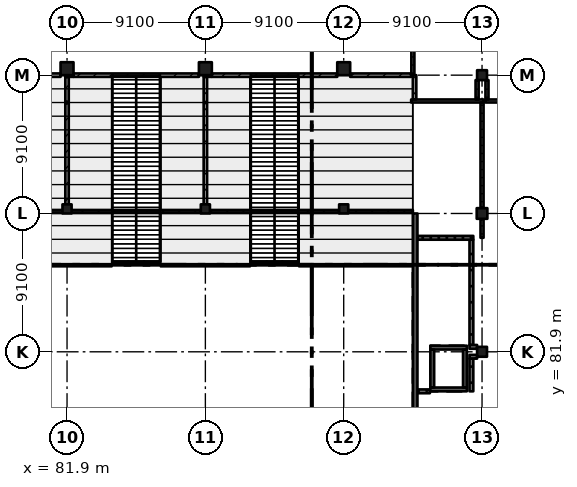
"""IFC4 building model, lengths in metres.
Left out: names, types, materials, properties, quantities, classifications, styles, units other than length and angle.
Written with IfcOpenShell. Run it as: python <this file> out.ifc"""

import sys

from ifc_helpers import new_model, si_unit, direction, frame, frame_2d, origin, origin_2d, place, context, subcontext, project, spatial, rectangle, extrude, element, fill, save


model = new_model("IFC4")
c1 = context("Model", 3, precision=1e-05, world=origin(), true_north=direction((0.0, 1.0)))
c2 = subcontext(c1, "Body", "Model", "MODEL_VIEW")
j1 = project(units=[si_unit("LENGTHUNIT", "METRE"), si_unit("PLANEANGLEUNIT", "RADIAN")], contexts=[c1])
p1 = place(None, origin())
s1 = spatial("IfcSite", under=j1, at=p1, CompositionType="ELEMENT")
p2 = place(p1, origin())
s2 = spatial("IfcBuilding", under=s1, at=p2, CompositionType="ELEMENT")
p3 = place(p2, frame((0.0, 0.0, 15.47)))
s3 = spatial("IfcBuildingStorey", under=s2, at=p3, CompositionType="ELEMENT", Elevation=15.47)
p4 = place(p3, frame((81.9, 91.3, 0.0), z_axis=(0.0, 0.0, 1.0), x_axis=(1.0, 0.0, 0.0)))
e1 = element("IfcColumn", 1, at=p4, inside=s3, PredefinedType="COLUMN", context=c2, shape_type="SweptSolid", body=[
    extrude(rectangle(XDim=0.6, YDim=0.6, at=origin_2d()), origin(), (0.0, 0.0, 1.0), 2.71),
])
p5 = place(p3, frame((81.9, 100.525, 0.0), z_axis=(0.0, 0.0, 1.0), x_axis=(1.0, 0.0, 0.0)))
e2 = element("IfcColumn", 2, at=p5, inside=s3, PredefinedType="COLUMN", context=c2, shape_type="SweptSolid", body=[
    extrude(rectangle(XDim=0.85, YDim=0.85, at=origin_2d()), origin(), (0.0, 0.0, 1.0), 4.55),
])
p6 = place(p3, frame((91.0, 91.3, 0.0), z_axis=(0.0, 0.0, 1.0), x_axis=(1.0, 0.0, 0.0)))
e3 = element("IfcColumn", 3, at=p6, inside=s3, PredefinedType="COLUMN", context=c2, shape_type="SweptSolid", body=[
    extrude(rectangle(XDim=0.6, YDim=0.6, at=origin_2d()), origin(), (0.0, 0.0, 1.0), 2.71),
])
p7 = place(p3, frame((91.0, 100.525, 0.0), z_axis=(0.0, 0.0, 1.0), x_axis=(1.0, 0.0, 0.0)))
e4 = element("IfcColumn", 4, at=p7, inside=s3, PredefinedType="COLUMN", context=c2, shape_type="SweptSolid", body=[
    extrude(rectangle(XDim=0.85, YDim=0.85, at=origin_2d()), origin(), (0.0, 0.0, 1.0), 4.55),
])
p8 = place(p3, frame((100.1, 91.3, 0.0), z_axis=(0.0, 0.0, 1.0), x_axis=(1.0, 0.0, 0.0)))
e5 = element("IfcColumn", 5, at=p8, inside=s3, PredefinedType="COLUMN", context=c2, shape_type="SweptSolid", body=[
    extrude(rectangle(XDim=0.6, YDim=0.6, at=origin_2d()), origin(), (0.0, 0.0, 1.0), 2.71),
])
p9 = place(p3, frame((100.1, 100.525, 0.0), z_axis=(0.0, 0.0, 1.0), x_axis=(1.0, 0.0, 0.0)))
e6 = element("IfcColumn", 6, at=p9, inside=s3, PredefinedType="COLUMN", context=c2, shape_type="SweptSolid", body=[
    extrude(rectangle(XDim=0.85, YDim=0.85, at=origin_2d()), origin(), (0.0, 0.0, 1.0), 4.55),
])
p10 = place(p3, frame((109.2, 81.9, 0.0), z_axis=(0.0, 0.0, 1.0), x_axis=(1.0, 0.0, 0.0)))
e7 = element("IfcColumn", 7, at=p10, inside=s3, PredefinedType="COLUMN", context=c2, shape_type="SweptSolid", body=[
    extrude(rectangle(XDim=0.65, YDim=0.65, at=origin_2d()), origin(), (0.0, 0.0, 1.0), 4.55),
])
p11 = place(p3, frame((109.2, 91.0, 0.0), z_axis=(0.0, 0.0, 1.0), x_axis=(1.0, 0.0, 0.0)))
e8 = element("IfcColumn", 8, at=p11, inside=s3, PredefinedType="COLUMN", context=c2, shape_type="SweptSolid", body=[
    extrude(rectangle(XDim=0.7, YDim=0.7, at=origin_2d()), origin(), (0.0, 0.0, 1.0), 4.55),
])
p12 = place(p3, frame((109.2, 100.1, 0.0), z_axis=(0.0, 0.0, 1.0), x_axis=(1.0, 0.0, 0.0)))
e9 = element("IfcColumn", 9, at=p12, inside=s3, PredefinedType="COLUMN", context=c2, shape_type="SweptSolid", body=[
    extrude(rectangle(XDim=0.65, YDim=0.65, at=origin_2d()), origin(), (0.0, 0.0, 1.0), 4.55),
])
p13 = place(p3, frame((104.8, 68.25, 0.0), z_axis=(0.0, 0.0, 1.0), x_axis=(0.0, 1.0, 0.0)))
e10 = element("IfcWall", 10, at=p13, inside=s3, PredefinedType="SHEAR", context=c2, shape_type="SweptSolid", body=[
    extrude(rectangle(XDim=22.75, YDim=0.3, at=frame_2d((11.375, 0.0))), origin(), (0.0, 0.0, 1.0), 4.55),
])
p14 = place(p3, frame((108.2, 79.425, 0.0), z_axis=(0.0, 0.0, 1.0), x_axis=(-1.0, 0.0, 0.0)))
e11 = element("IfcWall", 11, at=p14, inside=s3, PredefinedType="SHEAR", context=c2, shape_type="SweptSolid", body=[
    extrude(rectangle(XDim=2.4, YDim=0.25, at=frame_2d((1.2, 0.0))), origin(), (0.0, 0.0, 1.0), 4.55),
])
p15 = place(p14, frame((0.75, 0.0, 0.0)))
e12 = element("IfcOpeningElement", 12, at=p15, cuts=e11, PredefinedType="OPENING", context=c2, shape_type="SweptSolid", body=[
    extrude(rectangle(XDim=0.9, YDim=2.1, at=frame_2d((0.45, 1.05))), frame((0.0, 0.135, 0.0), z_axis=(0.0, -1.0, 0.0), x_axis=(1.0, 0.0, 0.0)), (0.0, 0.0, 1.0), 0.27),
])
p16 = place(p3, frame((108.2, 82.175, 0.0), z_axis=(0.0, 0.0, 1.0), x_axis=(-1.0, 0.0, 0.0)))
e13 = element("IfcWall", 13, at=p16, inside=s3, PredefinedType="SHEAR", context=c2, shape_type="SweptSolid", body=[
    extrude(rectangle(XDim=2.4, YDim=0.25, at=frame_2d((1.2, 0.0))), origin(), (0.0, 0.0, 1.0), 4.55),
])
for number, where, z_axis, x_axis in (
    (14, (105.925, 82.05, 0.0), (0.0, 0.0, 1.0), (0.0, -1.0, 0.0)),
    (15, (108.075, 82.05, 0.0), (0.0, 0.0, 1.0), (0.0, -1.0, 0.0)),
):
    element("IfcWall", number, at=place(p3, frame(where, z_axis=z_axis, x_axis=x_axis)), inside=s3, PredefinedType="SHEAR", context=c2, shape_type="SweptSolid", body=[
        extrude(rectangle(XDim=2.5, YDim=0.25, at=frame_2d((1.25, 0.0))), origin(), (0.0, 0.0, 1.0), 4.55),
    ])
p17 = place(p3, frame((81.475, 100.1, 0.0), z_axis=(0.0, 0.0, 1.0), x_axis=(-1.0, 0.0, 0.0)))
e16 = element("IfcWall", 16, at=p17, inside=s3, PredefinedType="PARTITIONING", context=c2, shape_type="SweptSolid", body=[
    extrude(rectangle(XDim=8.25, YDim=0.225, at=frame_2d((4.125, 0.0))), origin(), (0.0, 0.0, 1.0), 3.6),
])
p18 = place(p17, frame((3.65, 0.0, 0.0)))
e17 = element("IfcOpeningElement", 17, at=p18, cuts=e16, PredefinedType="OPENING", context=c2, shape_type="SweptSolid", body=[
    extrude(rectangle(XDim=1.0, YDim=2.4, at=frame_2d((0.5, 1.2))), frame((0.0, 0.123, 0.0), z_axis=(0.0, -1.0, 0.0), x_axis=(1.0, 0.0, 0.0)), (0.0, 0.0, 1.0), 0.245),
])
p19 = place(p3, frame((81.9, 98.27, 0.0), z_axis=(0.0, 0.0, 1.0), x_axis=(0.0, -1.0, 0.0)))
e18 = element("IfcWall", 18, at=p19, inside=s3, PredefinedType="PARTITIONING", context=c2, shape_type="SweptSolid", body=[
    extrude(rectangle(XDim=6.67, YDim=0.225, at=frame_2d((3.335, 0.0))), origin(), (0.0, 0.0, 1.0), 3.22),
])
p20 = place(p3, frame((81.9, 99.988, 0.0), z_axis=(0.0, 0.0, 1.0), x_axis=(0.0, -1.0, 0.0)))
e19 = element("IfcWall", 19, at=p20, inside=s3, PredefinedType="PARTITIONING", context=c2, shape_type="SweptSolid", body=[
    extrude(rectangle(XDim=1.657, YDim=0.225, at=frame_2d((0.829, 0.0))), origin(), (0.0, 0.0, 1.0), 3.22),
])
p21 = place(p3, frame((82.325, 100.1, 0.0), z_axis=(0.0, 0.0, 1.0), x_axis=(-1.0, 0.0, 0.0)))
e20 = element("IfcWall", 20, at=p21, inside=s3, PredefinedType="PARTITIONING", context=c2, shape_type="SweptSolid", body=[
    extrude(rectangle(XDim=0.537, YDim=0.225, at=frame_2d((0.269, 0.0))), origin(), (0.0, 0.0, 1.0), 3.22),
])
p22 = place(p3, frame((90.575, 100.1, 0.0), z_axis=(0.0, 0.0, 1.0), x_axis=(-1.0, 0.0, 0.0)))
e21 = element("IfcWall", 21, at=p22, inside=s3, PredefinedType="PARTITIONING", context=c2, shape_type="SweptSolid", body=[
    extrude(rectangle(XDim=8.25, YDim=0.225, at=frame_2d((4.125, 0.0))), origin(), (0.0, 0.0, 1.0), 3.6),
])
p23 = place(p22, frame((3.65, 0.0, 0.0)))
e22 = element("IfcOpeningElement", 22, at=p23, cuts=e21, PredefinedType="OPENING", context=c2, shape_type="SweptSolid", body=[
    extrude(rectangle(XDim=1.0, YDim=2.4, at=frame_2d((0.5, 1.2))), frame((0.0, 0.123, 0.0), z_axis=(0.0, -1.0, 0.0), x_axis=(1.0, 0.0, 0.0)), (0.0, 0.0, 1.0), 0.245),
])
p24 = place(p3, frame((91.0, 98.27, 0.0), z_axis=(0.0, 0.0, 1.0), x_axis=(0.0, -1.0, 0.0)))
e23 = element("IfcWall", 23, at=p24, inside=s3, PredefinedType="PARTITIONING", context=c2, shape_type="SweptSolid", body=[
    extrude(rectangle(XDim=6.67, YDim=0.225, at=frame_2d((3.335, 0.0))), origin(), (0.0, 0.0, 1.0), 3.22),
])
p25 = place(p3, frame((91.0, 99.988, 0.0), z_axis=(0.0, 0.0, 1.0), x_axis=(0.0, -1.0, 0.0)))
e24 = element("IfcWall", 24, at=p25, inside=s3, PredefinedType="PARTITIONING", context=c2, shape_type="SweptSolid", body=[
    extrude(rectangle(XDim=1.657, YDim=0.225, at=frame_2d((0.829, 0.0))), origin(), (0.0, 0.0, 1.0), 3.22),
])
p26 = place(p3, frame((91.425, 100.1, 0.0), z_axis=(0.0, 0.0, 1.0), x_axis=(-1.0, 0.0, 0.0)))
e25 = element("IfcWall", 25, at=p26, inside=s3, PredefinedType="PARTITIONING", context=c2, shape_type="SweptSolid", body=[
    extrude(rectangle(XDim=0.538, YDim=0.225, at=frame_2d((0.269, 0.0))), origin(), (0.0, 0.0, 1.0), 3.22),
])
p27 = place(p3, frame((99.675, 100.1, 0.0), z_axis=(0.0, 0.0, 1.0), x_axis=(-1.0, 0.0, 0.0)))
e26 = element("IfcWall", 26, at=p27, inside=s3, PredefinedType="PARTITIONING", context=c2, shape_type="SweptSolid", body=[
    extrude(rectangle(XDim=8.25, YDim=0.225, at=frame_2d((4.125, 0.0))), origin(), (0.0, 0.0, 1.0), 3.6),
])
p28 = place(p27, frame((3.65, 0.0, 0.0)))
e27 = element("IfcOpeningElement", 27, at=p28, cuts=e26, PredefinedType="OPENING", context=c2, shape_type="SweptSolid", body=[
    extrude(rectangle(XDim=1.0, YDim=2.4, at=frame_2d((0.5, 1.2))), frame((0.0, 0.123, 0.0), z_axis=(0.0, -1.0, 0.0), x_axis=(1.0, 0.0, 0.0)), (0.0, 0.0, 1.0), 0.245),
])
p29 = place(p3, frame((104.538, 98.4, 0.0), z_axis=(0.0, 0.0, 1.0), x_axis=(1.0, 0.0, 0.0)))
e28 = element("IfcWall", 28, at=p29, inside=s3, PredefinedType="PARTITIONING", context=c2, shape_type="SweptSolid", body=[
    extrude(rectangle(XDim=4.762, YDim=0.2, at=frame_2d((2.381, 0.0))), origin(), (0.0, 0.0, 1.0), 4.3),
])
p30 = place(p29, frame((1.25, 0.0, 0.0)))
e29 = element("IfcOpeningElement", 29, at=p30, cuts=e28, PredefinedType="OPENING", context=c2, shape_type="SweptSolid", body=[
    extrude(rectangle(XDim=1.8, YDim=2.4, at=frame_2d((0.9, 1.2))), frame((0.0, 0.11, 0.0), z_axis=(0.0, -1.0, 0.0), x_axis=(1.0, 0.0, 0.0)), (0.0, 0.0, 1.0), 0.22),
])
p31 = place(p3, frame((104.538, 100.1, 0.0), z_axis=(0.0, 0.0, 1.0), x_axis=(-1.0, 0.0, 0.0)))
e30 = element("IfcWall", 30, at=p31, inside=s3, PredefinedType="PARTITIONING", context=c2, shape_type="SweptSolid", body=[
    extrude(rectangle(XDim=4.013, YDim=0.225, at=frame_2d((2.006, 0.0))), origin(), (0.0, 0.0, 1.0), 3.6),
])
p32 = place(p3, frame((104.763, 98.5, 0.0), z_axis=(0.0, 0.0, 1.0), x_axis=(0.0, 1.0, 0.0)))
e31 = element("IfcWall", 31, at=p32, inside=s3, PredefinedType="PARTITIONING", context=c2, shape_type="SweptSolid", body=[
    extrude(rectangle(XDim=1.6, YDim=0.225, at=frame_2d((0.8, 0.0))), origin(), (0.0, 0.0, 1.0), 4.3),
])
p33 = place(p3, frame((104.65, 100.1, 0.0), z_axis=(0.0, 0.0, 1.0), x_axis=(0.0, 1.0, 0.0)))
e32 = element("IfcWall", 32, at=p33, inside=s3, PredefinedType="PARTITIONING", context=c2, shape_type="SweptSolid", body=[
    extrude(rectangle(XDim=3.6, YDim=0.2, at=frame_2d((1.8, 0.0))), origin(), (0.0, 0.0, 1.0), 3.7),
])
p34 = place(p33, frame((0.65, 0.0, 0.0)))
e33 = element("IfcOpeningElement", 33, at=p34, cuts=e32, PredefinedType="OPENING", context=c2, shape_type="SweptSolid", body=[
    extrude(rectangle(XDim=2.4, YDim=2.4, at=frame_2d((1.2, 1.2))), frame((0.0, 0.11, 0.0), z_axis=(0.0, -1.0, 0.0), x_axis=(1.0, 0.0, 0.0)), (0.0, 0.0, 1.0), 0.22),
])
p35 = place(p3, frame((105.77, 79.3, 0.0), z_axis=(0.0, 0.0, 1.0), x_axis=(-1.0, 0.0, 0.0)))
e34 = element("IfcWall", 34, at=p35, inside=s3, PredefinedType="SOLIDWALL", context=c2, shape_type="SweptSolid", body=[
    extrude(rectangle(XDim=0.82, YDim=0.25, at=frame_2d((0.41, 0.0))), origin(), (0.0, 0.0, 1.0), 4.3),
])
p36 = place(p3, frame((108.375, 81.575, 0.0), z_axis=(0.0, 0.0, 1.0), x_axis=(1.0, 0.0, 0.0)))
e35 = element("IfcWall", 35, at=p36, inside=s3, PredefinedType="SOLIDWALL", context=c2, shape_type="SweptSolid", body=[
    extrude(rectangle(XDim=0.5, YDim=0.25, at=frame_2d((0.25, 0.0))), origin(), (0.0, 0.0, 1.0), 4.3),
])
p37 = place(p3, frame((108.5, 79.3, 0.0), z_axis=(0.0, 0.0, 1.0), x_axis=(0.0, 1.0, 0.0)))
e36 = element("IfcWall", 36, at=p37, inside=s3, PredefinedType="SOLIDWALL", context=c2, shape_type="SweptSolid", body=[
    extrude(rectangle(XDim=2.15, YDim=0.25, at=frame_2d((1.075, 0.0))), origin(), (0.0, 0.0, 1.0), 4.3),
])
p38 = place(p3, frame((108.5, 82.35, 0.0), z_axis=(0.0, 0.0, 1.0), x_axis=(0.0, 1.0, 0.0)))
e37 = element("IfcWall", 37, at=p38, inside=s3, PredefinedType="SOLIDWALL", context=c2, shape_type="SweptSolid", body=[
    extrude(rectangle(XDim=6.925, YDim=0.25, at=frame_2d((3.462, 0.0))), origin(), (0.0, 0.0, 1.0), 4.3),
])
p39 = place(p3, frame((108.625, 89.4, 0.0), z_axis=(0.0, 0.0, 1.0), x_axis=(-1.0, 0.0, 0.0)))
e38 = element("IfcWall", 38, at=p39, inside=s3, PredefinedType="SOLIDWALL", context=c2, shape_type="SweptSolid", body=[
    extrude(rectangle(XDim=3.675, YDim=0.25, at=frame_2d((1.837, 0.0))), origin(), (0.0, 0.0, 1.0), 4.3),
])
p40 = place(p39, frame((1.45, 0.0, 0.0)))
e39 = element("IfcOpeningElement", 39, at=p40, cuts=e38, PredefinedType="OPENING", context=c2, shape_type="SweptSolid", body=[
    extrude(rectangle(XDim=0.8, YDim=2.1, at=frame_2d((0.4, 1.05))), frame((0.0, 0.135, 0.0), z_axis=(0.0, -1.0, 0.0), x_axis=(1.0, 0.0, 0.0)), (0.0, 0.0, 1.0), 0.27),
])
p41 = place(p3, frame((108.875, 82.225, 0.0), z_axis=(0.0, 0.0, 1.0), x_axis=(-1.0, 0.0, 0.0)))
e40 = element("IfcWall", 40, at=p41, inside=s3, PredefinedType="SOLIDWALL", context=c2, shape_type="SweptSolid", body=[
    extrude(rectangle(XDim=0.5, YDim=0.25, at=frame_2d((0.25, 0.0))), origin(), (0.0, 0.0, 1.0), 4.3),
])
p42 = place(p3, frame((108.875, 98.5, 0.0), z_axis=(0.0, 0.0, 1.0), x_axis=(0.0, 1.0, 0.0)))
e41 = element("IfcWall", 41, at=p42, inside=s3, PredefinedType="PARTITIONING", context=c2, shape_type="SweptSolid", body=[
    extrude(rectangle(XDim=1.275, YDim=0.2, at=frame_2d((0.637, 0.0))), origin(), (0.0, 0.0, 1.0), 4.3),
])
p43 = place(p3, frame((109.2, 89.4, 0.0), z_axis=(0.0, 0.0, 1.0), x_axis=(0.0, 1.0, 0.0)))
e42 = element("IfcWall", 42, at=p43, inside=s3, PredefinedType="PARTITIONING", context=c2, shape_type="SweptSolid", body=[
    extrude(rectangle(XDim=1.25, YDim=0.2, at=frame_2d((0.625, 0.0))), origin(), (0.0, 0.0, 1.0), 3.55),
])
p44 = place(p3, frame((109.2, 91.35, 0.0), z_axis=(0.0, 0.0, 1.0), x_axis=(0.0, 1.0, 0.0)))
e43 = element("IfcWall", 43, at=p44, inside=s3, PredefinedType="PARTITIONING", context=c2, shape_type="SweptSolid", body=[
    extrude(rectangle(XDim=6.95, YDim=0.2, at=frame_2d((3.475, 0.0))), origin(), (0.0, 0.0, 1.0), 3.55),
])
p45 = place(p44, frame((0.85, 0.0, 0.0)))
e44 = element("IfcOpeningElement", 44, at=p45, cuts=e43, PredefinedType="OPENING", context=c2, shape_type="SweptSolid", body=[
    extrude(rectangle(XDim=1.8, YDim=2.4, at=frame_2d((0.9, 1.2))), frame((0.0, 0.11, 0.0), z_axis=(0.0, -1.0, 0.0), x_axis=(1.0, 0.0, 0.0)), (0.0, 0.0, 1.0), 0.22),
])
p46 = place(p44, frame((4.35, 0.0, 0.0)))
e45 = element("IfcOpeningElement", 45, at=p46, cuts=e43, PredefinedType="OPENING", context=c2, shape_type="SweptSolid", body=[
    extrude(rectangle(XDim=1.8, YDim=2.4, at=frame_2d((0.9, 1.2))), frame((0.0, 0.11, 0.0), z_axis=(0.0, -1.0, 0.0), x_axis=(1.0, 0.0, 0.0)), (0.0, 0.0, 1.0), 0.22),
])
p47 = place(p3, frame((109.425, 98.4, 0.0), z_axis=(0.0, 0.0, 1.0), x_axis=(1.0, 0.0, 0.0)))
e46 = element("IfcWall", 46, at=p47, inside=s3, PredefinedType="PARTITIONING", context=c2, shape_type="SweptSolid", body=[
    extrude(rectangle(XDim=2.745, YDim=0.2, at=frame_2d((1.373, 0.0))), origin(), (0.0, 0.0, 1.0), 4.3),
])
p48 = place(p47, frame((0.45, 0.0, 0.0)))
e47 = element("IfcOpeningElement", 47, at=p48, cuts=e46, PredefinedType="OPENING", context=c2, shape_type="SweptSolid", body=[
    extrude(rectangle(XDim=1.8, YDim=2.4, at=frame_2d((0.9, 1.2))), frame((0.0, 0.11, 0.0), z_axis=(0.0, -1.0, 0.0), x_axis=(1.0, 0.0, 0.0)), (0.0, 0.0, 1.0), 0.22),
])
p49 = place(p3, frame((109.525, 99.775, 0.0), z_axis=(0.0, 0.0, 1.0), x_axis=(0.0, -1.0, 0.0)))
e48 = element("IfcWall", 48, at=p49, inside=s3, PredefinedType="PARTITIONING", context=c2, shape_type="SweptSolid", body=[
    extrude(rectangle(XDim=1.275, YDim=0.2, at=frame_2d((0.637, 0.0))), origin(), (0.0, 0.0, 1.0), 4.3),
])
p50 = place(p3, frame((81.6, 91.13, 0.0), z_axis=(0.0, 0.0, 1.0), x_axis=(-1.0, 0.0, 0.0)))
e49 = element("IfcWall", 49, at=p50, inside=s3, PredefinedType="PARTITIONING", context=c2, shape_type="SweptSolid", body=[
    extrude(rectangle(XDim=8.5, YDim=0.2, at=frame_2d((4.25, 0.0))), origin(), (0.0, 0.0, 1.0), 2.71),
])
p51 = place(p50, frame((1.25, 0.0, 1.1)))
e50 = element("IfcOpeningElement", 50, at=p51, cuts=e49, PredefinedType="OPENING", context=c2, shape_type="SweptSolid", body=[
    extrude(rectangle(XDim=6.0, YDim=1.3, at=frame_2d((3.0, 0.65))), frame((0.0, 0.11, 0.0), z_axis=(0.0, -1.0, 0.0), x_axis=(1.0, 0.0, 0.0)), (0.0, 0.0, 1.0), 0.22),
])
p52 = place(p3, frame((90.7, 91.13, 0.0), z_axis=(0.0, 0.0, 1.0), x_axis=(-1.0, 0.0, 0.0)))
e51 = element("IfcWall", 51, at=p52, inside=s3, PredefinedType="PARTITIONING", context=c2, shape_type="SweptSolid", body=[
    extrude(rectangle(XDim=8.5, YDim=0.2, at=frame_2d((4.25, 0.0))), origin(), (0.0, 0.0, 1.0), 2.71),
])
p53 = place(p52, frame((1.25, 0.0, 1.1)))
e52 = element("IfcOpeningElement", 52, at=p53, cuts=e51, PredefinedType="OPENING", context=c2, shape_type="SweptSolid", body=[
    extrude(rectangle(XDim=6.0, YDim=1.3, at=frame_2d((3.0, 0.65))), frame((0.0, 0.11, 0.0), z_axis=(0.0, -1.0, 0.0), x_axis=(1.0, 0.0, 0.0)), (0.0, 0.0, 1.0), 0.22),
])
p54 = place(p3, frame((104.65, 91.13, 0.0), z_axis=(0.0, 0.0, 1.0), x_axis=(-1.0, 0.0, 0.0)))
e53 = element("IfcWall", 53, at=p54, inside=s3, PredefinedType="PARTITIONING", context=c2, shape_type="SweptSolid", body=[
    extrude(rectangle(XDim=4.25, YDim=0.2, at=frame_2d((2.125, 0.0))), origin(), (0.0, 0.0, 1.0), 2.91),
])
p55 = place(p54, frame((1.125, 0.0, 1.1)))
e54 = element("IfcOpeningElement", 54, at=p55, cuts=e53, PredefinedType="OPENING", context=c2, shape_type="SweptSolid", body=[
    extrude(rectangle(XDim=2.0, YDim=1.3, at=frame_2d((1.0, 0.65))), frame((0.0, 0.11, 0.0), z_axis=(0.0, -1.0, 0.0), x_axis=(1.0, 0.0, 0.0)), (0.0, 0.0, 1.0), 0.22),
])
p56 = place(p3, frame((99.8, 91.13, 0.0), z_axis=(0.0, 0.0, 1.0), x_axis=(-1.0, 0.0, 0.0)))
e55 = element("IfcWall", 55, at=p56, inside=s3, PredefinedType="PARTITIONING", context=c2, shape_type="SweptSolid", body=[
    extrude(rectangle(XDim=8.5, YDim=0.2, at=frame_2d((4.25, 0.0))), origin(), (0.0, 0.0, 1.0), 2.71),
])
p57 = place(p56, frame((1.25, 0.0, 1.1)))
e56 = element("IfcOpeningElement", 56, at=p57, cuts=e55, PredefinedType="OPENING", context=c2, shape_type="SweptSolid", body=[
    extrude(rectangle(XDim=6.0, YDim=1.3, at=frame_2d((3.0, 0.65))), frame((0.0, 0.11, 0.0), z_axis=(0.0, -1.0, 0.0), x_axis=(1.0, 0.0, 0.0)), (0.0, 0.0, 1.0), 0.22),
])
p58 = place(p53, origin())
e57 = element("IfcWindow", 57, at=p58, inside=s3, PartitioningType="SINGLE_PANEL", PredefinedType="WINDOW", context=c2, shape_type="SweptSolid", body=[
    extrude(rectangle(XDim=6.0, YDim=1.3, at=frame_2d((3.0, 0.65))), frame((0.0, 0.03, 0.0), z_axis=(0.0, -1.0, 0.0), x_axis=(1.0, 0.0, 0.0)), (0.0, 0.0, 1.0), 0.06),
])
fill(e52, e57)
p59 = place(p55, origin())
e58 = element("IfcWindow", 58, at=p59, inside=s3, PartitioningType="SINGLE_PANEL", PredefinedType="WINDOW", context=c2, shape_type="SweptSolid", body=[
    extrude(rectangle(XDim=2.0, YDim=1.3, at=frame_2d((1.0, 0.65))), frame((0.0, 0.03, 0.0), z_axis=(0.0, -1.0, 0.0), x_axis=(1.0, 0.0, 0.0)), (0.0, 0.0, 1.0), 0.06),
])
fill(e54, e58)
p60 = place(p57, origin())
e59 = element("IfcWindow", 59, at=p60, inside=s3, PartitioningType="SINGLE_PANEL", PredefinedType="WINDOW", context=c2, shape_type="SweptSolid", body=[
    extrude(rectangle(XDim=6.0, YDim=1.3, at=frame_2d((3.0, 0.65))), frame((0.0, 0.03, 0.0), z_axis=(0.0, -1.0, 0.0), x_axis=(1.0, 0.0, 0.0)), (0.0, 0.0, 1.0), 0.06),
])
fill(e56, e59)
p61 = place(p40, origin())
e60 = element("IfcDoor", 60, at=p61, inside=s3, OperationType="SINGLE_SWING_LEFT", PredefinedType="DOOR", context=c2, shape_type="SweptSolid", body=[
    extrude(rectangle(XDim=0.8, YDim=2.1, at=frame_2d((0.4, 1.05))), frame((0.0, 0.025, 0.0), z_axis=(0.0, -1.0, 0.0), x_axis=(1.0, 0.0, 0.0)), (0.0, 0.0, 1.0), 0.05),
])
fill(e39, e60)
p62 = place(p23, origin())
e61 = element("IfcDoor", 61, at=p62, inside=s3, OperationType="SINGLE_SWING_LEFT", PredefinedType="DOOR", context=c2, shape_type="SweptSolid", body=[
    extrude(rectangle(XDim=1.0, YDim=2.4, at=frame_2d((0.5, 1.2))), frame((0.0, 0.025, 0.0), z_axis=(0.0, -1.0, 0.0), x_axis=(1.0, 0.0, 0.0)), (0.0, 0.0, 1.0), 0.05),
])
fill(e22, e61)
p63 = place(p28, origin())
e62 = element("IfcDoor", 62, at=p63, inside=s3, OperationType="SINGLE_SWING_LEFT", PredefinedType="DOOR", context=c2, shape_type="SweptSolid", body=[
    extrude(rectangle(XDim=1.0, YDim=2.4, at=frame_2d((0.5, 1.2))), frame((0.0, 0.025, 0.0), z_axis=(0.0, -1.0, 0.0), x_axis=(1.0, 0.0, 0.0)), (0.0, 0.0, 1.0), 0.05),
])
fill(e27, e62)
p64 = place(p45, origin())
e63 = element("IfcDoor", 63, at=p64, inside=s3, OperationType="DOUBLE_DOOR_SINGLE_SWING", PredefinedType="DOOR", context=c2, shape_type="SweptSolid", body=[
    extrude(rectangle(XDim=1.8, YDim=2.4, at=frame_2d((0.9, 1.2))), frame((0.0, 0.025, 0.0), z_axis=(0.0, -1.0, 0.0), x_axis=(1.0, 0.0, 0.0)), (0.0, 0.0, 1.0), 0.05),
])
fill(e44, e63)
p65 = place(p46, origin())
e64 = element("IfcDoor", 64, at=p65, inside=s3, OperationType="DOUBLE_DOOR_SINGLE_SWING", PredefinedType="DOOR", context=c2, shape_type="SweptSolid", body=[
    extrude(rectangle(XDim=1.8, YDim=2.4, at=frame_2d((0.9, 1.2))), frame((0.0, 0.025, 0.0), z_axis=(0.0, -1.0, 0.0), x_axis=(1.0, 0.0, 0.0)), (0.0, 0.0, 1.0), 0.05),
])
fill(e45, e64)
p66 = place(p48, origin())
e65 = element("IfcDoor", 65, at=p66, inside=s3, OperationType="DOUBLE_DOOR_SINGLE_SWING", PredefinedType="DOOR", context=c2, shape_type="SweptSolid", body=[
    extrude(rectangle(XDim=1.8, YDim=2.4, at=frame_2d((0.9, 1.2))), frame((0.0, 0.025, 0.0), z_axis=(0.0, -1.0, 0.0), x_axis=(1.0, 0.0, 0.0)), (0.0, 0.0, 1.0), 0.05),
])
fill(e47, e65)
p67 = place(p30, origin())
e66 = element("IfcDoor", 66, at=p67, inside=s3, OperationType="DOUBLE_DOOR_SINGLE_SWING", PredefinedType="DOOR", context=c2, shape_type="SweptSolid", body=[
    extrude(rectangle(XDim=1.8, YDim=2.4, at=frame_2d((0.9, 1.2))), frame((0.0, 0.025, 0.0), z_axis=(0.0, -1.0, 0.0), x_axis=(1.0, 0.0, 0.0)), (0.0, 0.0, 1.0), 0.05),
])
fill(e29, e66)
p68 = place(p34, origin())
e67 = element("IfcDoor", 67, at=p68, inside=s3, OperationType="DOUBLE_DOOR_SINGLE_SWING", PredefinedType="DOOR", context=c2, shape_type="SweptSolid", body=[
    extrude(rectangle(XDim=2.4, YDim=2.4, at=frame_2d((1.2, 1.2))), frame((0.0, 0.025, 0.0), z_axis=(0.0, -1.0, 0.0), x_axis=(1.0, 0.0, 0.0)), (0.0, 0.0, 1.0), 0.05),
])
fill(e33, e67)
p69 = place(p15, origin())
e68 = element("IfcDoor", 68, at=p69, inside=s3, OperationType="SINGLE_SWING_LEFT", PredefinedType="DOOR", context=c2, shape_type="SweptSolid", body=[
    extrude(rectangle(XDim=0.9, YDim=2.1, at=frame_2d((0.45, 1.05))), frame((0.0, 0.025, 0.0), z_axis=(0.0, -1.0, 0.0), x_axis=(1.0, 0.0, 0.0)), (0.0, 0.0, 1.0), 0.05),
])
fill(e12, e68)
save(model, sys.argv[1])
